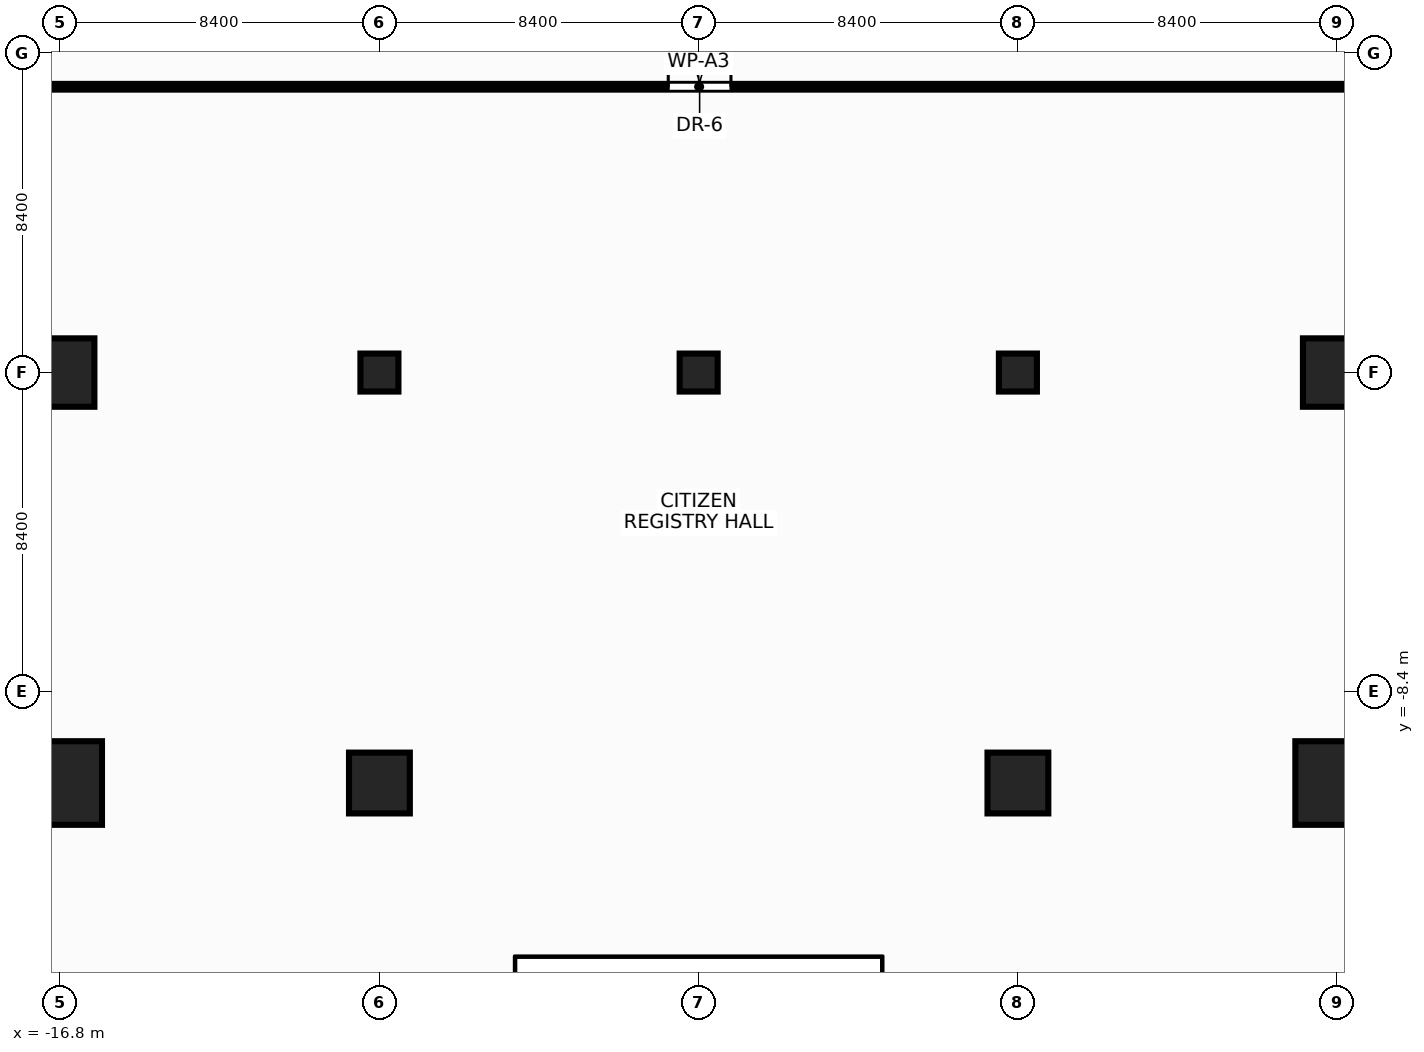
"""IFC4 building model, lengths in metres.
Left out: names, types, materials, properties, quantities, classifications, styles, units other than length and angle.
Written with IfcOpenShell. Run it as: python <this file> out.ifc"""

import sys

from ifc_helpers import new_model, si_unit, direction, frame, frame_2d, origin, origin_with_axes, origin_2d, place, context, subcontext, project, spatial, rectangle, hollow_rectangle, extrude, source, transform, mapped, element, fill, save


model = new_model("IFC4")
c1 = context("Model", 3, precision=1e-05, world=origin(), true_north=direction((0.0, 1.0)))
c2 = subcontext(c1, "Body", "Model", "MODEL_VIEW")
j1 = project(units=[si_unit("LENGTHUNIT", "METRE"), si_unit("PLANEANGLEUNIT", "RADIAN")], contexts=[c1])
p1 = place(None, origin())
s1 = spatial("IfcSite", under=j1, at=p1, CompositionType="ELEMENT")
p2 = place(p1, origin())
s2 = spatial("IfcBuilding", under=s1, at=p2, CompositionType="ELEMENT")
p3 = place(p2, frame((0.0, 0.0, 5.0)))
s3 = spatial("IfcBuildingStorey", under=s2, at=p3, CompositionType="ELEMENT", Elevation=5.0)
m1 = source(origin(), c2, "Body", "SweptSolid", [
    extrude(rectangle(XDim=2.2, YDim=2.2, at=origin_2d()), origin(), (0.0, 0.0, 1.0), 4.65),
])
p4 = place(p3, frame((-16.8, -10.8, 0.0), z_axis=(0.0, 0.0, 1.0), x_axis=(1.0, 0.0, 0.0)))
e1 = element("IfcColumn", 1, at=p4, inside=s3, PredefinedType="COLUMN", context=c2, shape_type="MappedRepresentation", body=[
    mapped(m1, transform((0.0, 0.0, 0.0), x_axis=(1.0, 0.0, 0.0), y_axis=(0.0, 1.0, 0.0), z_axis=(0.0, 0.0, 1.0), scale=1.0)),
])
m2 = source(origin(), c2, "Body", "SweptSolid", [
    extrude(rectangle(XDim=1.8, YDim=1.8, at=origin_2d()), origin(), (0.0, 0.0, 1.0), 4.65),
])
p5 = place(p3, frame((-16.8, 0.0, 0.0), z_axis=(0.0, 0.0, 1.0), x_axis=(1.0, 0.0, 0.0)))
e2 = element("IfcColumn", 2, at=p5, inside=s3, PredefinedType="COLUMN", context=c2, shape_type="MappedRepresentation", body=[
    mapped(m2, transform((0.0, 0.0, 0.0), x_axis=(1.0, 0.0, 0.0), y_axis=(0.0, 1.0, 0.0), z_axis=(0.0, 0.0, 1.0), scale=1.0)),
])
p6 = place(p3, frame((16.8, -10.8, 0.0), z_axis=(0.0, 0.0, 1.0), x_axis=(1.0, 0.0, 0.0)))
e3 = element("IfcColumn", 3, at=p6, inside=s3, PredefinedType="COLUMN", context=c2, shape_type="MappedRepresentation", body=[
    mapped(m1, transform((0.0, 0.0, 0.0), x_axis=(1.0, 0.0, 0.0), y_axis=(0.0, 1.0, 0.0), z_axis=(0.0, 0.0, 1.0), scale=1.0)),
])
p7 = place(p3, frame((16.8, 0.0, 0.0), z_axis=(0.0, 0.0, 1.0), x_axis=(1.0, 0.0, 0.0)))
e4 = element("IfcColumn", 4, at=p7, inside=s3, PredefinedType="COLUMN", context=c2, shape_type="MappedRepresentation", body=[
    mapped(m2, transform((0.0, 0.0, 0.0), x_axis=(1.0, 0.0, 0.0), y_axis=(0.0, 1.0, 0.0), z_axis=(0.0, 0.0, 1.0), scale=1.0)),
])
m3 = source(origin(), c2, "Body", "SweptSolid", [
    extrude(hollow_rectangle(XDim=1.0, YDim=1.0, WallThickness=0.045, at=origin_2d()), origin(), (0.0, 0.0, 1.0), 4.65),
])
p8 = place(p3, frame((-8.4, 0.0, 0.0), z_axis=(0.0, 0.0, 1.0), x_axis=(1.0, 0.0, 0.0)))
e5 = element("IfcColumn", 5, at=p8, inside=s3, PredefinedType="COLUMN", context=c2, shape_type="MappedRepresentation", body=[
    mapped(m3, transform((0.0, 0.0, 0.0), x_axis=(1.0, 0.0, 0.0), y_axis=(0.0, 1.0, 0.0), z_axis=(0.0, 0.0, 1.0), scale=1.0)),
])
m4 = source(origin(), c2, "Body", "SweptSolid", [
    extrude(rectangle(XDim=1.6, YDim=1.6, at=origin_2d()), origin(), (0.0, 0.0, 1.0), 4.65),
])
p9 = place(p3, frame((-8.4, -10.8, 0.0), z_axis=(0.0, 0.0, 1.0), x_axis=(1.0, 0.0, 0.0)))
e6 = element("IfcColumn", 6, at=p9, inside=s3, PredefinedType="COLUMN", context=c2, shape_type="MappedRepresentation", body=[
    mapped(m4, transform((0.0, 0.0, 0.0), x_axis=(1.0, 0.0, 0.0), y_axis=(0.0, 1.0, 0.0), z_axis=(0.0, 0.0, 1.0), scale=1.0)),
])
p10 = place(p3, frame((8.4, 0.0, 0.0), z_axis=(0.0, 0.0, 1.0), x_axis=(1.0, 0.0, 0.0)))
e7 = element("IfcColumn", 7, at=p10, inside=s3, PredefinedType="COLUMN", context=c2, shape_type="MappedRepresentation", body=[
    mapped(m3, transform((0.0, 0.0, 0.0), x_axis=(1.0, 0.0, 0.0), y_axis=(0.0, 1.0, 0.0), z_axis=(0.0, 0.0, 1.0), scale=1.0)),
])
p11 = place(p3, frame((8.4, -10.8, 0.0), z_axis=(0.0, 0.0, 1.0), x_axis=(1.0, 0.0, 0.0)))
e8 = element("IfcColumn", 8, at=p11, inside=s3, PredefinedType="COLUMN", context=c2, shape_type="MappedRepresentation", body=[
    mapped(m4, transform((0.0, 0.0, 0.0), x_axis=(1.0, 0.0, 0.0), y_axis=(0.0, 1.0, 0.0), z_axis=(0.0, 0.0, 1.0), scale=1.0)),
])
m5 = source(origin(), c2, "Body", "SweptSolid", [
    extrude(rectangle(XDim=1.0, YDim=1.0, at=origin_2d()), origin(), (0.0, 0.0, 1.0), 4.65),
])
p12 = place(p3, origin_with_axes())
e9 = element("IfcColumn", 9, at=p12, inside=s3, PredefinedType="COLUMN", context=c2, shape_type="MappedRepresentation", body=[
    mapped(m5, transform((0.0, 0.0, 0.0), x_axis=(1.0, 0.0, 0.0), y_axis=(0.0, 1.0, 0.0), z_axis=(0.0, 0.0, 1.0), scale=1.0)),
])
m6 = source(origin(), c2, "Body", "SweptSolid", [
    extrude(rectangle(XDim=77.0, YDim=0.15, at=frame_2d((38.5, 0.0))), origin(), (0.0, 0.0, 1.0), 3.755),
])
p13 = place(p3, frame((-38.5, 7.52, 0.0), z_axis=(0.0, 0.0, 1.0), x_axis=(1.0, 0.0, 0.0)))
e10 = element("IfcWall", 10, at=p13, inside=s3, PredefinedType="PARTITIONING", context=c2, shape_type="MappedRepresentation", body=[
    mapped(m6, transform((0.0, 0.0, 0.0), x_axis=(1.0, 0.0, 0.0), y_axis=(0.0, 1.0, 0.0), z_axis=(0.0, 0.0, 1.0), scale=1.0)),
])
p14 = place(p13, frame((4.2, 0.0, 0.0)))
e11 = element("IfcOpeningElement", 11, at=p14, cuts=e10, PredefinedType="OPENING", context=c2, shape_type="SweptSolid", body=[
    extrude(rectangle(XDim=1.04, YDim=2.2, at=frame_2d((0.52, 1.1))), frame((0.0, 0.087, 0.0), z_axis=(0.0, -1.0, 0.0), x_axis=(1.0, 0.0, 0.0)), (0.0, 0.0, 1.0), 0.174),
])
p15 = place(p13, frame((37.7, 0.0, 0.0)))
e12 = element("IfcOpeningElement", 12, at=p15, cuts=e10, PredefinedType="OPENING", context=c2, shape_type="SweptSolid", body=[
    extrude(rectangle(XDim=1.65, YDim=2.35, at=frame_2d((0.825, 1.175))), frame((0.0, 0.087, 0.0), z_axis=(0.0, -1.0, 0.0), x_axis=(1.0, 0.0, 0.0)), (0.0, 0.0, 1.0), 0.174),
])
p16 = place(p13, frame((71.7, 0.0, 0.0)))
e13 = element("IfcOpeningElement", 13, at=p16, cuts=e10, PredefinedType="OPENING", context=c2, shape_type="SweptSolid", body=[
    extrude(rectangle(XDim=1.04, YDim=2.2, at=frame_2d((0.52, 1.1))), frame((0.0, 0.087, 0.0), z_axis=(0.0, -1.0, 0.0), x_axis=(1.0, 0.0, 0.0)), (0.0, 0.0, 1.0), 0.174),
])
m7 = source(origin(), c2, "Body", "SweptSolid", [
    extrude(rectangle(XDim=1.65, YDim=2.35, at=frame_2d((0.825, 1.175))), frame((0.0, 0.025, 0.0), z_axis=(0.0, -1.0, 0.0), x_axis=(1.0, 0.0, 0.0)), (0.0, 0.0, 1.0), 0.05),
])
p17 = place(p15, origin())
e14 = element("IfcDoor", 14, at=p17, inside=s3, OperationType="DOUBLE_DOOR_SINGLE_SWING", PredefinedType="DOOR", context=c2, shape_type="MappedRepresentation", body=[
    mapped(m7, transform((0.0, 0.0, 0.0), x_axis=(1.0, 0.0, 0.0), y_axis=(0.0, 1.0, 0.0), z_axis=(0.0, 0.0, 1.0), scale=1.0)),
])
fill(e12, e14)
save(model, sys.argv[1])
